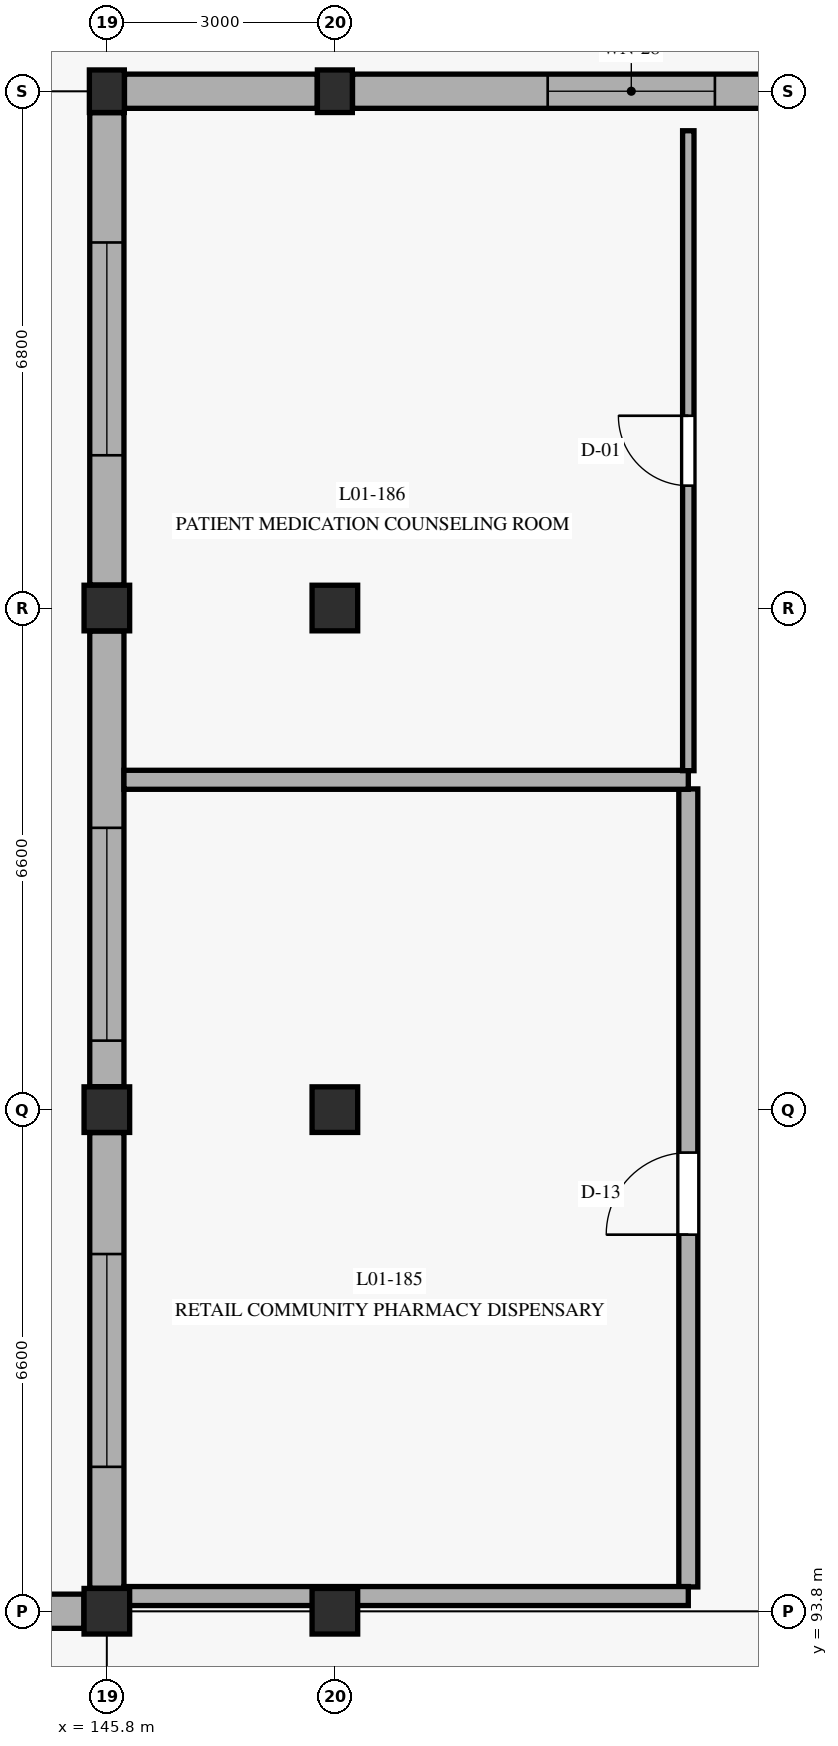
"""IFC4 building model, lengths in metres.
Left out: names, types, materials, properties, quantities, classifications, styles, units other than length and angle.
Written with IfcOpenShell. Run it as: python <this file> out.ifc"""

import sys

from ifc_helpers import new_model, si_unit, direction, frame, frame_2d, origin, origin_with_axes, origin_2d, place, context, subcontext, project, spatial, rectangle, extrude, element, fill, save


model = new_model("IFC4")
c1 = context("Model", 3, precision=1e-05, world=origin(), true_north=direction((0.0, 1.0)))
c2 = subcontext(c1, "Body", "Model", "MODEL_VIEW")
j1 = project(units=[si_unit("LENGTHUNIT", "METRE"), si_unit("PLANEANGLEUNIT", "RADIAN")], contexts=[c1])
p1 = place(None, origin())
s1 = spatial("IfcSite", under=j1, at=p1, CompositionType="ELEMENT")
p2 = place(p1, origin())
s2 = spatial("IfcBuilding", under=s1, at=p2, CompositionType="ELEMENT")
p3 = place(p2, origin())
s3 = spatial("IfcBuildingStorey", under=s2, at=p3, CompositionType="ELEMENT", Elevation=0.0)
for number, where, z_axis, x_axis in (
    (1, (145.8, 93.8, 0.0), (0.0, 0.0, 1.0), (1.0, 0.0, 0.0)),
    (2, (145.8, 100.4, 0.0), (0.0, 0.0, 1.0), (1.0, 0.0, 0.0)),
    (3, (145.8, 107.0, 0.0), (0.0, 0.0, 1.0), (1.0, 0.0, 0.0)),
):
    element("IfcColumn", number, at=place(p3, frame(where, z_axis=z_axis, x_axis=x_axis)), inside=s3, PredefinedType="COLUMN", context=c2, shape_type="SweptSolid", body=[
        extrude(rectangle(XDim=0.6, YDim=0.6, at=origin_2d()), origin(), (0.0, 0.0, 1.0), 4.8),
    ])
p4 = place(p3, frame((145.8, 113.8, 0.0), z_axis=(0.0, 0.0, 1.0), x_axis=(1.0, 0.0, 0.0)))
e4 = element("IfcColumn", 4, at=p4, inside=s3, PredefinedType="COLUMN", context=c2, shape_type="SweptSolid", body=[
    extrude(rectangle(XDim=0.46, YDim=0.56, at=origin_2d()), origin(), (0.0, 0.0, 1.0), 4.8),
])
for number, where, z_axis, x_axis in (
    (5, (148.8, 93.8, 0.0), (0.0, 0.0, 1.0), (1.0, 0.0, 0.0)),
    (6, (148.8, 100.4, 0.0), (0.0, 0.0, 1.0), (1.0, 0.0, 0.0)),
    (7, (148.8, 107.0, 0.0), (0.0, 0.0, 1.0), (1.0, 0.0, 0.0)),
):
    element("IfcColumn", number, at=place(p3, frame(where, z_axis=z_axis, x_axis=x_axis)), inside=s3, PredefinedType="COLUMN", context=c2, shape_type="SweptSolid", body=[
        extrude(rectangle(XDim=0.6, YDim=0.6, at=origin_2d()), origin(), (0.0, 0.0, 1.0), 4.8),
    ])
p5 = place(p3, frame((148.8, 113.8, 0.0), z_axis=(0.0, 0.0, 1.0), x_axis=(1.0, 0.0, 0.0)))
e8 = element("IfcColumn", 8, at=p5, inside=s3, PredefinedType="COLUMN", context=c2, shape_type="SweptSolid", body=[
    extrude(rectangle(XDim=0.46, YDim=0.56, at=origin_2d()), origin(), (0.0, 0.0, 1.0), 4.8),
])
p6 = place(p3, frame((145.8, 100.098, 0.0), z_axis=(0.0, 0.0, 1.0), x_axis=(0.0, -1.0, 0.0)))
e9 = element("IfcWall", 9, at=p6, inside=s3, PredefinedType="SOLIDWALL", context=c2, shape_type="SweptSolid", body=[
    extrude(rectangle(XDim=5.996, YDim=0.45, at=frame_2d((2.998, 0.0))), origin(), (0.0, 0.0, 1.0), 4.04),
])
p7 = place(p6, frame((1.598, 0.0, 0.6)))
e10 = element("IfcOpeningElement", 10, at=p7, cuts=e9, PredefinedType="OPENING", context=c2, shape_type="SweptSolid", body=[
    extrude(rectangle(XDim=2.8, YDim=2.5, at=frame_2d((1.4, 1.25))), frame((0.0, 0.235, 0.0), z_axis=(0.0, -1.0, 0.0), x_axis=(1.0, 0.0, 0.0)), (0.0, 0.0, 1.0), 0.47),
])
p8 = place(p3, frame((145.8, 106.698, 0.0), z_axis=(0.0, 0.0, 1.0), x_axis=(0.0, -1.0, 0.0)))
e11 = element("IfcWall", 11, at=p8, inside=s3, PredefinedType="SOLIDWALL", context=c2, shape_type="SweptSolid", body=[
    extrude(rectangle(XDim=5.996, YDim=0.45, at=frame_2d((2.998, 0.0))), origin(), (0.0, 0.0, 1.0), 4.09),
])
p9 = place(p8, frame((2.59, 0.0, 0.6)))
e12 = element("IfcOpeningElement", 12, at=p9, cuts=e11, PredefinedType="OPENING", context=c2, shape_type="SweptSolid", body=[
    extrude(rectangle(XDim=2.8, YDim=2.5, at=frame_2d((1.4, 1.25))), frame((0.0, 0.235, 0.0), z_axis=(0.0, -1.0, 0.0), x_axis=(1.0, 0.0, 0.0)), (0.0, 0.0, 1.0), 0.47),
])
p10 = place(p3, frame((145.8, 113.518, 0.0), z_axis=(0.0, 0.0, 1.0), x_axis=(0.0, -1.0, 0.0)))
e13 = element("IfcWall", 13, at=p10, inside=s3, PredefinedType="SOLIDWALL", context=c2, shape_type="SweptSolid", body=[
    extrude(rectangle(XDim=6.216, YDim=0.45, at=frame_2d((3.108, 0.0))), origin(), (0.0, 0.0, 1.0), 4.09),
])
p11 = place(p10, frame((1.708, 0.0, 0.6)))
e14 = element("IfcOpeningElement", 14, at=p11, cuts=e13, PredefinedType="OPENING", context=c2, shape_type="SweptSolid", body=[
    extrude(rectangle(XDim=2.8, YDim=2.5, at=frame_2d((1.4, 1.25))), frame((0.0, 0.235, 0.0), z_axis=(0.0, -1.0, 0.0), x_axis=(1.0, 0.0, 0.0)), (0.0, 0.0, 1.0), 0.47),
])
p12 = place(p3, frame((156.368, 113.8, 0.0), z_axis=(0.0, 0.0, 1.0), x_axis=(-1.0, 0.0, 0.0)))
e15 = element("IfcWall", 15, at=p12, inside=s3, PredefinedType="SOLIDWALL", context=c2, shape_type="SweptSolid", body=[
    extrude(rectangle(XDim=7.336, YDim=0.45, at=frame_2d((3.668, 0.0))), origin(), (0.0, 0.0, 1.0), 4.0),
])
p13 = place(p12, frame((2.568, 0.0, 0.9)))
e16 = element("IfcOpeningElement", 16, at=p13, cuts=e15, PredefinedType="OPENING", context=c2, shape_type="SweptSolid", body=[
    extrude(rectangle(XDim=2.2, YDim=1.1, at=frame_2d((1.1, 0.55))), frame((0.0, 0.235, 0.0), z_axis=(0.0, -1.0, 0.0), x_axis=(1.0, 0.0, 0.0)), (0.0, 0.0, 1.0), 0.47),
])
p14 = place(p3, frame((148.568, 113.8, 0.0), z_axis=(0.0, 0.0, 1.0), x_axis=(-1.0, 0.0, 0.0)))
e17 = element("IfcWall", 17, at=p14, inside=s3, PredefinedType="SOLIDWALL", context=c2, shape_type="SweptSolid", body=[
    extrude(rectangle(XDim=2.536, YDim=0.45, at=frame_2d((1.268, 0.0))), origin(), (0.0, 0.0, 1.0), 4.0),
])
p15 = place(p3, frame((145.498, 93.8, 0.0), z_axis=(0.0, 0.0, 1.0), x_axis=(-1.0, 0.0, 0.0)))
e18 = element("IfcWall", 18, at=p15, inside=s3, PredefinedType="SOLIDWALL", context=c2, shape_type="SweptSolid", body=[
    extrude(rectangle(XDim=2.476, YDim=0.45, at=frame_2d((1.238, 0.0))), origin(), (0.0, 0.0, 1.0), 4.14),
])
p16 = place(p15, frame((0.713, 0.0, 0.85)))
e19 = element("IfcOpeningElement", 19, at=p16, cuts=e18, PredefinedType="OPENING", context=c2, shape_type="SweptSolid", body=[
    extrude(rectangle(XDim=1.05, YDim=2.2, at=frame_2d((0.525, 1.1))), frame((0.0, 0.235, 0.0), z_axis=(0.0, -1.0, 0.0), x_axis=(1.0, 0.0, 0.0)), (0.0, 0.0, 1.0), 0.47),
])
p17 = place(p3, frame((153.45, 94.12, 0.0), z_axis=(0.0, 0.0, 1.0), x_axis=(0.0, 1.0, 0.0)))
e20 = element("IfcWall", 20, at=p17, inside=s3, PredefinedType="SOLIDWALL", context=c2, shape_type="SweptSolid", body=[
    extrude(rectangle(XDim=10.5, YDim=0.25, at=frame_2d((5.25, 0.0))), origin(), (0.0, 0.0, 1.0), 4.095),
])
p18 = place(p17, frame((4.635, 0.0, 0.0)))
e21 = element("IfcOpeningElement", 21, at=p18, cuts=e20, PredefinedType="OPENING", context=c2, shape_type="SweptSolid", body=[
    extrude(rectangle(XDim=1.08, YDim=2.2, at=frame_2d((0.54, 1.1))), frame((0.0, 0.135, 0.0), z_axis=(0.0, -1.0, 0.0), x_axis=(1.0, 0.0, 0.0)), (0.0, 0.0, 1.0), 0.27),
])
p19 = place(p3, frame((146.025, 94.0, 0.0), z_axis=(0.0, 0.0, 1.0), x_axis=(1.0, 0.0, 0.0)))
e22 = element("IfcWall", 22, at=p19, inside=s3, PredefinedType="SOLIDWALL", context=c2, shape_type="SweptSolid", body=[
    extrude(rectangle(XDim=7.425, YDim=0.25, at=frame_2d((3.712, 0.0))), origin(), (0.0, 0.0, 1.0), 4.035),
])
p20 = place(p3, frame((146.025, 104.74, 0.0), z_axis=(0.0, 0.0, 1.0), x_axis=(1.0, 0.0, 0.0)))
e23 = element("IfcWall", 23, at=p20, inside=s3, PredefinedType="SOLIDWALL", context=c2, shape_type="SweptSolid", body=[
    extrude(rectangle(XDim=7.425, YDim=0.25, at=frame_2d((3.712, 0.0))), origin(), (0.0, 0.0, 1.0), 4.085),
])
p21 = place(p3, frame((153.45, 104.86, 0.0), z_axis=(0.0, 0.0, 1.0), x_axis=(0.0, 1.0, 0.0)))
e24 = element("IfcWall", 24, at=p21, inside=s3, PredefinedType="PARTITIONING", context=c2, shape_type="SweptSolid", body=[
    extrude(rectangle(XDim=8.42, YDim=0.15, at=frame_2d((4.21, 0.0))), origin(), (0.0, 0.0, 1.0), 4.095),
])
p22 = place(p21, frame((3.75, 0.0, 0.0)))
e25 = element("IfcOpeningElement", 25, at=p22, cuts=e24, PredefinedType="OPENING", context=c2, shape_type="SweptSolid", body=[
    extrude(rectangle(XDim=0.92, YDim=2.15, at=frame_2d((0.46, 1.075))), frame((0.0, 0.085, 0.0), z_axis=(0.0, -1.0, 0.0), x_axis=(1.0, 0.0, 0.0)), (0.0, 0.0, 1.0), 0.17),
])
p23 = place(p7, origin_with_axes())
e26 = element("IfcWindow", 26, at=p23, inside=s3, PartitioningType="SINGLE_PANEL", PredefinedType="WINDOW", context=c2, shape_type="SweptSolid", body=[
    extrude(rectangle(XDim=2.8, YDim=2.5, at=frame_2d((1.4, 1.25))), frame((0.0, 0.03, 0.0), z_axis=(0.0, -1.0, 0.0), x_axis=(1.0, 0.0, 0.0)), (0.0, 0.0, 1.0), 0.06),
])
fill(e10, e26)
p24 = place(p9, origin_with_axes())
e27 = element("IfcWindow", 27, at=p24, inside=s3, PartitioningType="SINGLE_PANEL", PredefinedType="WINDOW", context=c2, shape_type="SweptSolid", body=[
    extrude(rectangle(XDim=2.8, YDim=2.5, at=frame_2d((1.4, 1.25))), frame((0.0, 0.03, 0.0), z_axis=(0.0, -1.0, 0.0), x_axis=(1.0, 0.0, 0.0)), (0.0, 0.0, 1.0), 0.06),
])
fill(e12, e27)
p25 = place(p11, origin_with_axes())
e28 = element("IfcWindow", 28, at=p25, inside=s3, PartitioningType="SINGLE_PANEL", PredefinedType="WINDOW", context=c2, shape_type="SweptSolid", body=[
    extrude(rectangle(XDim=2.8, YDim=2.5, at=frame_2d((1.4, 1.25))), frame((0.0, 0.03, 0.0), z_axis=(0.0, -1.0, 0.0), x_axis=(1.0, 0.0, 0.0)), (0.0, 0.0, 1.0), 0.06),
])
fill(e14, e28)
p26 = place(p13, origin_with_axes())
e29 = element("IfcWindow", 29, at=p26, inside=s3, PartitioningType="SINGLE_PANEL", PredefinedType="WINDOW", context=c2, shape_type="SweptSolid", body=[
    extrude(rectangle(XDim=2.2, YDim=1.1, at=frame_2d((1.1, 0.55))), frame((0.0, 0.03, 0.0), z_axis=(0.0, -1.0, 0.0), x_axis=(1.0, 0.0, 0.0)), (0.0, 0.0, 1.0), 0.06),
])
fill(e16, e29)
p27 = place(p18, origin_with_axes())
e30 = element("IfcDoor", 30, at=p27, inside=s3, OperationType="SINGLE_SWING_LEFT", PredefinedType="DOOR", context=c2, shape_type="SweptSolid", body=[
    extrude(rectangle(XDim=1.08, YDim=2.2, at=frame_2d((0.54, 1.1))), frame((0.0, 0.025, 0.0), z_axis=(0.0, -1.0, 0.0), x_axis=(1.0, 0.0, 0.0)), (0.0, 0.0, 1.0), 0.05),
])
fill(e21, e30)
p28 = place(p22, origin_with_axes())
e31 = element("IfcDoor", 31, at=p28, inside=s3, OperationType="SINGLE_SWING_RIGHT", PredefinedType="DOOR", context=c2, shape_type="SweptSolid", body=[
    extrude(rectangle(XDim=0.92, YDim=2.15, at=frame_2d((0.46, 1.075))), frame((0.0, 0.025, 0.0), z_axis=(0.0, -1.0, 0.0), x_axis=(1.0, 0.0, 0.0)), (0.0, 0.0, 1.0), 0.05),
])
fill(e25, e31)
save(model, sys.argv[1])
